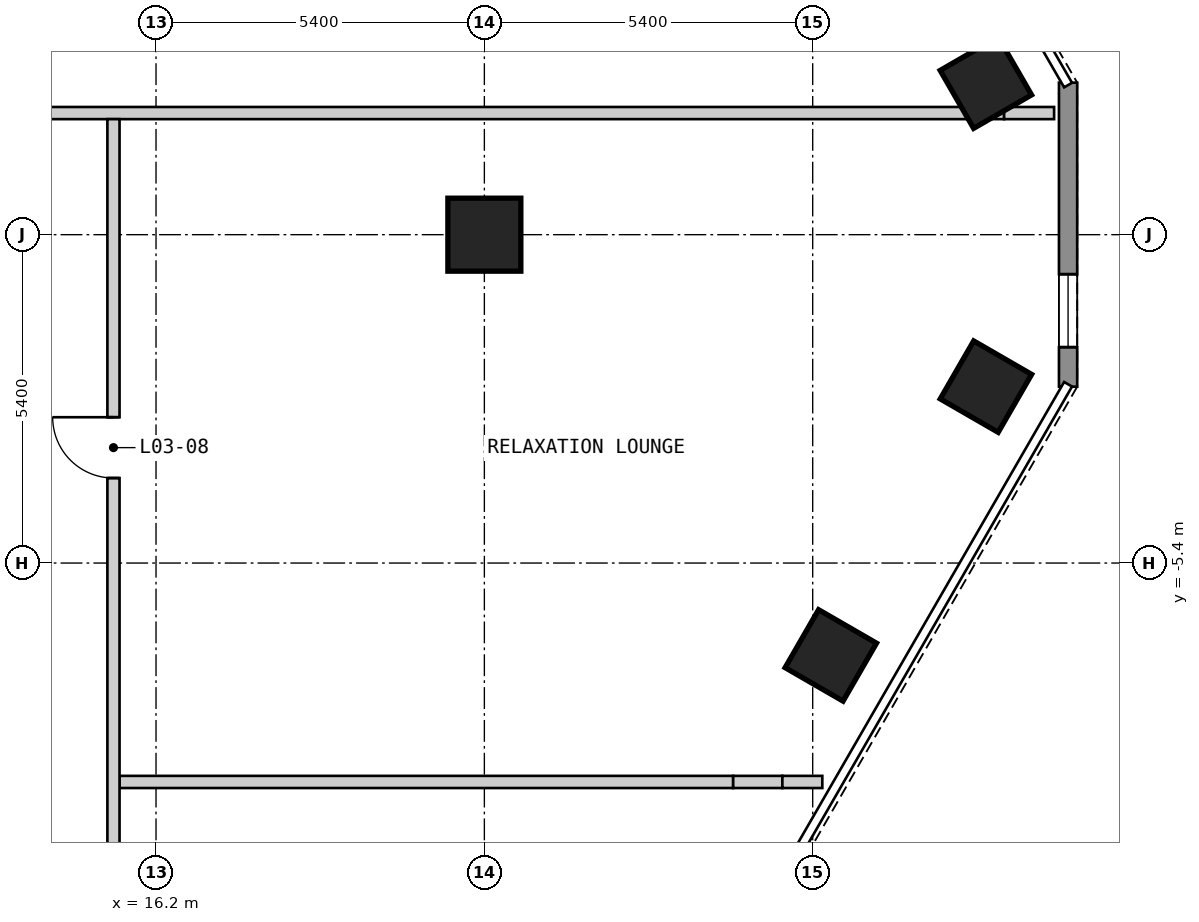
"""IFC4 building model, lengths in metres.
Left out: names, types, materials, properties, quantities, classifications, styles, units other than length and angle.
Written with IfcOpenShell. Run it as: python <this file> out.ifc"""

import sys

from ifc_helpers import new_model, si_unit, direction, frame, frame_2d, origin, origin_2d, place, context, subcontext, project, spatial, polyline, rectangle, outline, extrude, element, fill, save


model = new_model("IFC4")
c1 = context("Model", 3, precision=1e-05, world=origin(), true_north=direction((0.0, 1.0)))
c2 = subcontext(c1, "Body", "Model", "MODEL_VIEW")
j1 = project(units=[si_unit("LENGTHUNIT", "METRE"), si_unit("PLANEANGLEUNIT", "RADIAN")], contexts=[c1])
p1 = place(None, origin())
s1 = spatial("IfcSite", under=j1, at=p1, CompositionType="ELEMENT")
p2 = place(p1, origin())
s2 = spatial("IfcBuilding", under=s1, at=p2, CompositionType="ELEMENT")
p3 = place(p2, frame((0.0, 0.0, 12.6)))
s3 = spatial("IfcBuildingStorey", under=s2, at=p3, CompositionType="ELEMENT", Elevation=12.6)
for number, where, z_axis, x_axis in (
    (1, (27.298, -6.919, 0.0), (0.0, 0.0, 1.0), (0.5, 0.866, 0.0)),
    (2, (29.849, -2.499, 0.0), (0.0, 0.0, 1.0), (0.5, 0.866, 0.0)),
    (3, (29.848, 2.5, 0.0), (0.0, 0.0, 1.0), (-0.5, 0.866, 0.0)),
):
    element("IfcColumn", number, at=place(p3, frame(where, z_axis=z_axis, x_axis=x_axis)), inside=s3, PredefinedType="COLUMN", context=c2, shape_type="SweptSolid", body=[
        extrude(rectangle(XDim=1.1, YDim=1.1, at=origin_2d()), origin(), (0.0, 0.0, 1.0), 3.6),
    ])
p4 = place(p3, frame((21.6, 0.0, 0.0), z_axis=(0.0, 0.0, 1.0), x_axis=(1.0, 0.0, 0.0)))
e4 = element("IfcColumn", 4, at=p4, inside=s3, PredefinedType="COLUMN", context=c2, shape_type="SweptSolid", body=[
    extrude(rectangle(XDim=1.2, YDim=1.2, at=origin_2d()), origin(), (0.0, 0.0, 1.0), 3.6),
])
p5 = place(p3, frame((31.2, -2.5, 0.0), z_axis=(0.0, 0.0, 1.0), x_axis=(0.0, 1.0, 0.0)))
e5 = element("IfcWall", 5, at=p5, inside=s3, PredefinedType="SOLIDWALL", context=c2, shape_type="SweptSolid", body=[
    extrude(outline(polyline([(0.0, -0.15), (5.0, -0.15), (4.92, 0.15), (0.08, 0.15), (0.0, -0.15)])), origin(), (0.0, 0.0, 1.0), 3.25),
])
p6 = place(p5, frame((0.65, 0.0, 0.15)))
e6 = element("IfcOpeningElement", 6, at=p6, cuts=e5, PredefinedType="OPENING", context=c2, shape_type="SweptSolid", body=[
    extrude(rectangle(XDim=1.2, YDim=2.1, at=frame_2d((0.6, 1.05))), frame((0.0, 0.16, 0.0), z_axis=(0.0, -1.0, 0.0), x_axis=(1.0, 0.0, 0.0)), (0.0, 0.0, 1.0), 0.32),
])
p7 = place(p3, frame((15.6, -9.0, 0.0), z_axis=(0.0, 0.0, 1.0), x_axis=(1.0, 0.0, 0.0)))
e7 = element("IfcWall", 7, at=p7, inside=s3, PredefinedType="PARTITIONING", context=c2, shape_type="SweptSolid", body=[
    extrude(rectangle(XDim=10.092, YDim=0.2, at=frame_2d((5.046, 0.0))), origin(), (0.0, 0.0, 1.0), 3.25),
])
p8 = place(p3, frame((25.692, -9.0, 0.0), z_axis=(0.0, 0.0, 1.0), x_axis=(1.0, 0.0, 0.0)))
e8 = element("IfcWall", 8, at=p8, inside=s3, PredefinedType="PARTITIONING", context=c2, shape_type="SweptSolid", body=[
    extrude(rectangle(XDim=0.809, YDim=0.2, at=frame_2d((0.405, 0.0))), origin(), (0.0, 0.0, 1.0), 2.52),
])
p9 = place(p3, frame((26.501, -9.0, 0.0), z_axis=(0.0, 0.0, 1.0), x_axis=(1.0, 0.0, 0.0)))
e9 = element("IfcWall", 9, at=p9, inside=s3, PredefinedType="PARTITIONING", context=c2, shape_type="SweptSolid", body=[
    extrude(rectangle(XDim=0.657, YDim=0.2, at=frame_2d((0.329, 0.0))), origin(), (0.0, 0.0, 1.0), 3.25),
])
p10 = place(p3, frame((-29.549, 2.0, 0.0), z_axis=(0.0, 0.0, 1.0), x_axis=(1.0, 0.0, 0.0)))
e10 = element("IfcWall", 10, at=p10, inside=s3, PredefinedType="PARTITIONING", context=c2, shape_type="SweptSolid", body=[
    extrude(rectangle(XDim=59.097, YDim=0.2, at=frame_2d((29.549, 0.0))), origin(), (0.0, 0.0, 1.0), 3.25),
])
p11 = place(p10, frame((21.517, 0.0, 0.0)))
e11 = element("IfcOpeningElement", 11, at=p11, cuts=e10, PredefinedType="OPENING", context=c2, shape_type="SweptSolid", body=[
    extrude(rectangle(XDim=1.8, YDim=2.1, at=frame_2d((0.9, 1.05))), frame((0.0, 0.11, 0.0), z_axis=(0.0, -1.0, 0.0), x_axis=(1.0, 0.0, 0.0)), (0.0, 0.0, 1.0), 0.22),
])
p12 = place(p10, frame((35.781, 0.0, 0.0)))
e12 = element("IfcOpeningElement", 12, at=p12, cuts=e10, PredefinedType="OPENING", context=c2, shape_type="SweptSolid", body=[
    extrude(rectangle(XDim=1.8, YDim=2.1, at=frame_2d((0.9, 1.05))), frame((0.0, 0.11, 0.0), z_axis=(0.0, -1.0, 0.0), x_axis=(1.0, 0.0, 0.0)), (0.0, 0.0, 1.0), 0.22),
])
p13 = place(p3, frame((29.548, 2.0, 0.0), z_axis=(0.0, 0.0, 1.0), x_axis=(1.0, 0.0, 0.0)))
e13 = element("IfcWall", 13, at=p13, inside=s3, PredefinedType="PARTITIONING", context=c2, shape_type="SweptSolid", body=[
    extrude(rectangle(XDim=0.6, YDim=0.2, at=frame_2d((0.3, 0.0))), origin(), (0.0, 0.0, 1.0), 2.52),
])
p14 = place(p3, frame((30.148, 2.0, 0.0), z_axis=(0.0, 0.0, 1.0), x_axis=(1.0, 0.0, 0.0)))
e14 = element("IfcWall", 14, at=p14, inside=s3, PredefinedType="PARTITIONING", context=c2, shape_type="SweptSolid", body=[
    extrude(rectangle(XDim=0.822, YDim=0.2, at=frame_2d((0.411, 0.0))), origin(), (0.0, 0.0, 1.0), 3.25),
])
p15 = place(p3, frame((15.5, -25.114, 0.0), z_axis=(0.0, 0.0, 1.0), x_axis=(0.0, 1.0, 0.0)))
e15 = element("IfcWall", 15, at=p15, inside=s3, PredefinedType="PARTITIONING", context=c2, shape_type="SweptSolid", body=[
    extrude(rectangle(XDim=27.014, YDim=0.2, at=frame_2d((13.507, 0.0))), origin(), (0.0, 0.0, 1.0), 3.25),
])
p16 = place(p15, frame((10.516, 0.0, 0.0), z_axis=(0.0, 0.0, 1.0), x_axis=(-1.0, 0.0, 0.0)))
e16 = element("IfcOpeningElement", 16, at=p16, cuts=e15, PredefinedType="OPENING", context=c2, shape_type="SweptSolid", body=[
    extrude(rectangle(XDim=1.0, YDim=2.1, at=frame_2d((0.5, 1.05))), frame((0.0, 0.11, 0.0), z_axis=(0.0, -1.0, 0.0), x_axis=(1.0, 0.0, 0.0)), (0.0, 0.0, 1.0), 0.22),
])
p17 = place(p15, frame((22.112, 0.0, 0.0), z_axis=(0.0, 0.0, 1.0), x_axis=(-1.0, 0.0, 0.0)))
e17 = element("IfcOpeningElement", 17, at=p17, cuts=e15, PredefinedType="OPENING", context=c2, shape_type="SweptSolid", body=[
    extrude(rectangle(XDim=1.0, YDim=2.1, at=frame_2d((0.5, 1.05))), frame((0.0, 0.11, 0.0), z_axis=(0.0, -1.0, 0.0), x_axis=(1.0, 0.0, 0.0)), (0.0, 0.0, 1.0), 0.22),
])
p18 = place(p6, origin())
e18 = element("IfcWindow", 18, at=p18, inside=s3, PartitioningType="SINGLE_PANEL", PredefinedType="WINDOW", context=c2, shape_type="SweptSolid", body=[
    extrude(rectangle(XDim=1.2, YDim=2.1, at=frame_2d((0.6, 1.05))), frame((0.0, 0.03, 0.0), z_axis=(0.0, -1.0, 0.0), x_axis=(1.0, 0.0, 0.0)), (0.0, 0.0, 1.0), 0.06),
])
fill(e6, e18)
p19 = place(p17, origin())
e19 = element("IfcDoor", 19, at=p19, inside=s3, OperationType="SINGLE_SWING_LEFT", PredefinedType="DOOR", context=c2, shape_type="SweptSolid", body=[
    extrude(rectangle(XDim=1.0, YDim=2.1, at=frame_2d((0.5, 1.05))), frame((0.0, 0.025, 0.0), z_axis=(0.0, -1.0, 0.0), x_axis=(1.0, 0.0, 0.0)), (0.0, 0.0, 1.0), 0.05),
])
fill(e17, e19)
save(model, sys.argv[1])
